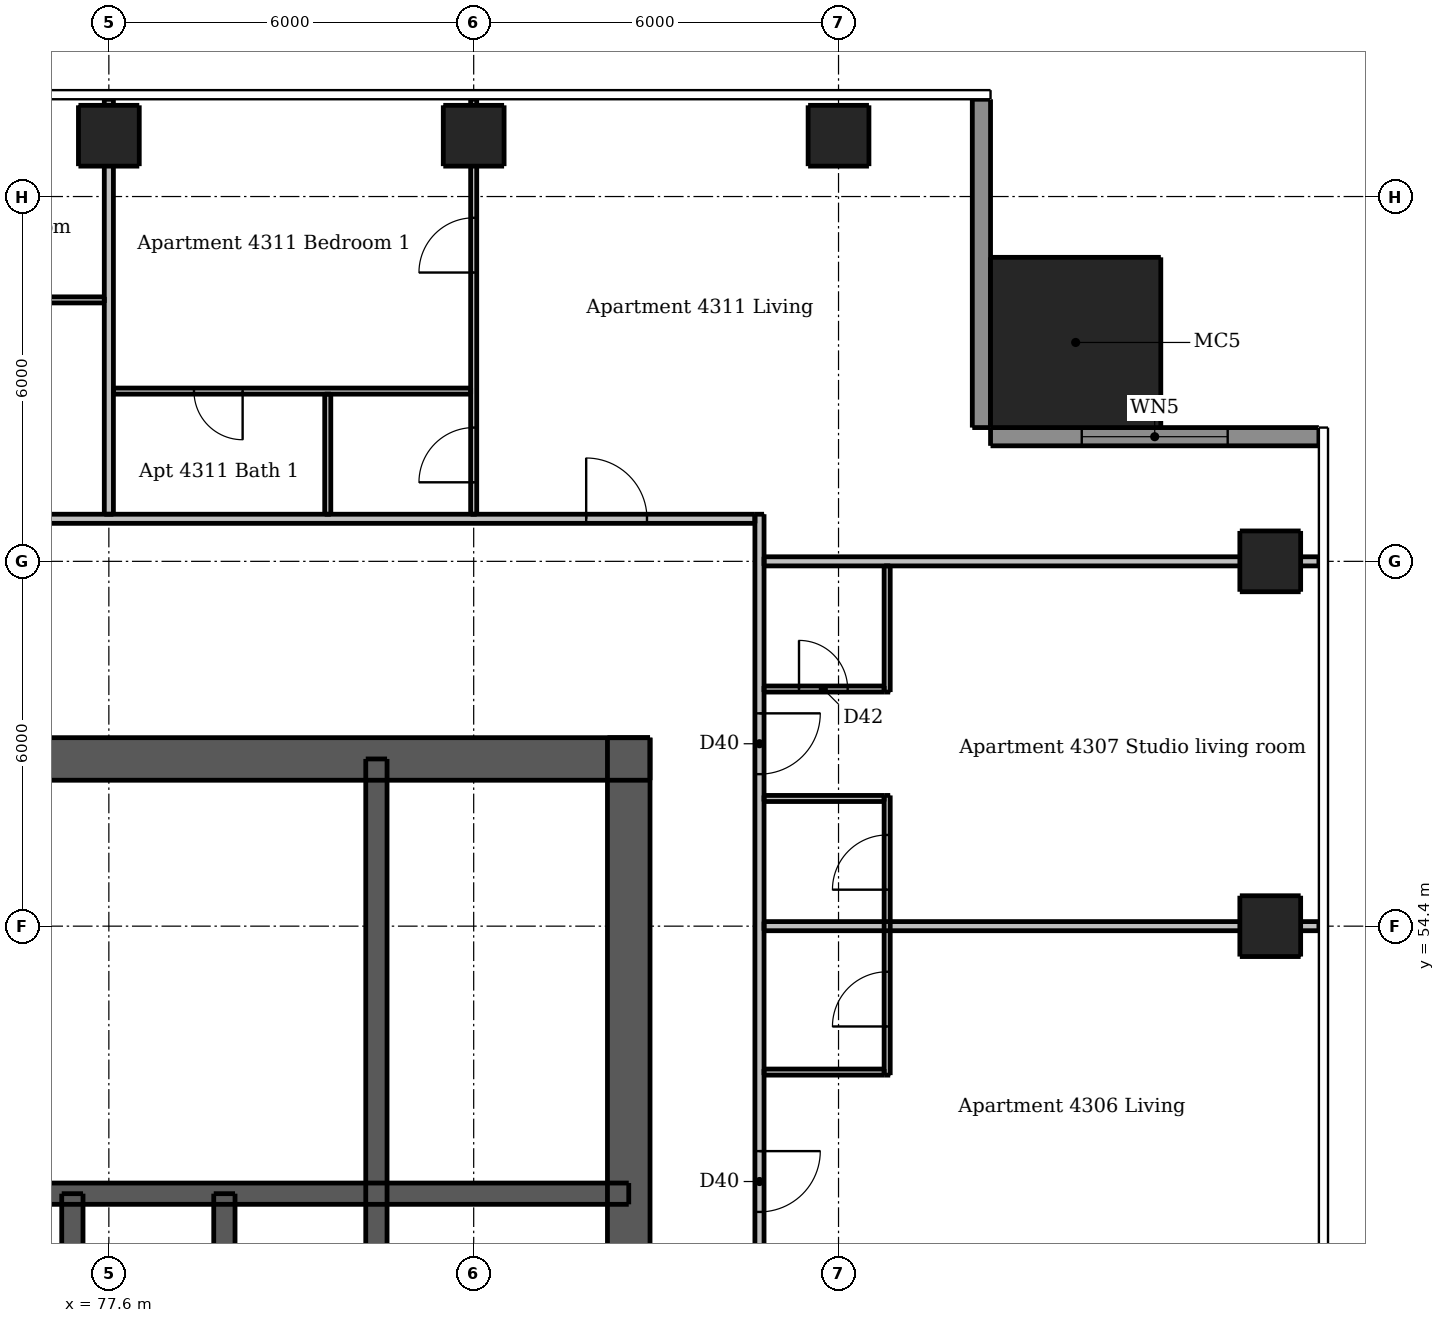
"""IFC4 building model, lengths in metres.
Left out: names, types, materials, properties, quantities, classifications, styles, units other than length and angle.
Written with IfcOpenShell. Run it as: python <this file> out.ifc"""

import sys

from ifc_helpers import new_model, si_unit, direction, frame, frame_2d, origin, origin_2d, place, context, subcontext, project, spatial, rectangle, extrude, element, fill, save


model = new_model("IFC4")
c1 = context("Model", 3, precision=1e-05, world=origin(), true_north=direction((0.0, 1.0)))
c2 = subcontext(c1, "Body", "Model", "MODEL_VIEW")
j1 = project(units=[si_unit("LENGTHUNIT", "METRE"), si_unit("PLANEANGLEUNIT", "RADIAN")], contexts=[c1])
p1 = place(None, origin())
s1 = spatial("IfcSite", under=j1, at=p1, CompositionType="ELEMENT")
p2 = place(p1, origin())
s2 = spatial("IfcBuilding", under=s1, at=p2, CompositionType="ELEMENT")
p3 = place(p2, frame((0.0, 0.0, 161.5)))
s3 = spatial("IfcBuildingStorey", under=s2, at=p3, CompositionType="ELEMENT", Elevation=161.5)
p4 = place(p3, frame((62.5, 57.15, 0.0), z_axis=(0.0, 0.0, 1.0), x_axis=(1.0, 0.0, 0.0)))
e1 = element("IfcWall", 1, at=p4, inside=s3, PredefinedType="SHEAR", context=c2, shape_type="SweptSolid", body=[
    extrude(rectangle(XDim=24.0, YDim=0.7, at=frame_2d((12.0, 0.0))), origin(), (0.0, 0.0, 1.0), 3.05),
])
p5 = place(p4, frame((20.938, 0.0, 0.0)))
e2 = element("IfcOpeningElement", 2, at=p5, cuts=e1, PredefinedType="OPENING", context=c2, shape_type="SweptSolid", body=[
    extrude(rectangle(XDim=1.1, YDim=2.1, at=frame_2d((0.55, 1.05))), frame((0.0, 0.36, 0.0), z_axis=(0.0, -1.0, 0.0), x_axis=(1.0, 0.0, 0.0)), (0.0, 0.0, 1.0), 0.72),
])
p6 = place(p4, frame((1.962, 0.0, 0.0)))
e3 = element("IfcOpeningElement", 3, at=p6, cuts=e1, PredefinedType="OPENING", context=c2, shape_type="SweptSolid", body=[
    extrude(rectangle(XDim=1.1, YDim=2.1, at=frame_2d((0.55, 1.05))), frame((0.0, 0.36, 0.0), z_axis=(0.0, -1.0, 0.0), x_axis=(1.0, 0.0, 0.0)), (0.0, 0.0, 1.0), 0.72),
])
p7 = place(p4, frame((11.55, 0.0, 0.0)))
e4 = element("IfcOpeningElement", 4, at=p7, cuts=e1, PredefinedType="OPENING", context=c2, shape_type="SweptSolid", body=[
    extrude(rectangle(XDim=0.9, YDim=2.1, at=frame_2d((0.45, 1.05))), frame((0.0, 0.36, 0.0), z_axis=(0.0, -1.0, 0.0), x_axis=(1.0, 0.0, 0.0)), (0.0, 0.0, 1.0), 0.72),
])
p8 = place(p3, frame((86.15, 33.5, 0.0), z_axis=(0.0, 0.0, 1.0), x_axis=(0.0, 1.0, 0.0)))
e5 = element("IfcWall", 5, at=p8, inside=s3, PredefinedType="SHEAR", context=c2, shape_type="SweptSolid", body=[
    extrude(rectangle(XDim=24.0, YDim=0.7, at=frame_2d((12.0, 0.0))), origin(), (0.0, 0.0, 1.0), 3.05),
])
p9 = place(p8, frame((11.2, 0.0, 0.0)))
e6 = element("IfcOpeningElement", 6, at=p9, cuts=e5, PredefinedType="OPENING", context=c2, shape_type="SweptSolid", body=[
    extrude(rectangle(XDim=1.6, YDim=2.1, at=frame_2d((0.8, 1.05))), frame((0.0, 0.36, 0.0), z_axis=(0.0, -1.0, 0.0), x_axis=(1.0, 0.0, 0.0)), (0.0, 0.0, 1.0), 0.72),
])
p10 = place(p3, frame((62.85, 50.0, 0.0), z_axis=(0.0, 0.0, 1.0), x_axis=(1.0, 0.0, 0.0)))
e7 = element("IfcWall", 7, at=p10, inside=s3, PredefinedType="SHEAR", context=c2, shape_type="SweptSolid", body=[
    extrude(rectangle(XDim=23.3, YDim=0.35, at=frame_2d((11.65, 0.0))), origin(), (0.0, 0.0, 1.0), 3.05),
])
p11 = place(p3, frame((82.0, 47.1, 0.0), z_axis=(0.0, 0.0, 1.0), x_axis=(0.0, 1.0, 0.0)))
e8 = element("IfcWall", 8, at=p11, inside=s3, PredefinedType="SHEAR", context=c2, shape_type="SweptSolid", body=[
    extrude(rectangle(XDim=10.05, YDim=0.35, at=frame_2d((5.025, 0.0))), origin(), (0.0, 0.0, 1.0), 3.05),
])
for number, where, z_axis, x_axis in (
    (9, (77.0, 47.1, 0.0), (0.0, 0.0, 1.0), (0.0, 1.0, 0.0)),
    (10, (79.5, 47.1, 0.0), (0.0, 0.0, 1.0), (0.0, 1.0, 0.0)),
):
    element("IfcWall", number, at=place(p3, frame(where, z_axis=z_axis, x_axis=x_axis)), inside=s3, PredefinedType="SHEAR", context=c2, shape_type="SweptSolid", body=[
        extrude(rectangle(XDim=2.9, YDim=0.35, at=frame_2d((1.45, 0.0))), origin(), (0.0, 0.0, 1.0), 3.05),
    ])
for number, where, z_axis, x_axis in (
    (11, (96.7, 54.4, 0.0), (0.0, 0.0, 1.0), (1.0, 0.0, 0.0)),
    (12, (96.7, 60.4, 0.0), (0.0, 0.0, 1.0), (1.0, 0.0, 0.0)),
    (13, (77.6, 67.4, 0.0), (0.0, 0.0, 1.0), (1.0, 0.0, 0.0)),
    (14, (83.6, 67.4, 0.0), (0.0, 0.0, 1.0), (1.0, 0.0, 0.0)),
    (15, (89.6, 67.4, 0.0), (0.0, 0.0, 1.0), (1.0, 0.0, 0.0)),
):
    element("IfcColumn", number, at=place(p3, frame(where, z_axis=z_axis, x_axis=x_axis)), inside=s3, PredefinedType="COLUMN", context=c2, shape_type="SweptSolid", body=[
        extrude(rectangle(XDim=1.0, YDim=1.0, at=origin_2d()), origin(), (0.0, 0.0, 1.0), 3.05),
    ])
p12 = place(p3, frame((93.5, 64.0, 0.0), z_axis=(0.0, 0.0, 1.0), x_axis=(1.0, 0.0, 0.0)))
e16 = element("IfcColumn", 16, at=p12, inside=s3, PredefinedType="COLUMN", context=c2, shape_type="SweptSolid", body=[
    extrude(rectangle(XDim=2.8, YDim=2.8, at=origin_2d()), origin(), (0.0, 0.0, 1.0), 3.3),
])
p13 = place(p3, frame((97.5, 62.45, 0.0), z_axis=(0.0, 0.0, 1.0), x_axis=(-1.0, 0.0, 0.0)))
e17 = element("IfcWall", 17, at=p13, inside=s3, PredefinedType="SOLIDWALL", context=c2, shape_type="SweptSolid", body=[
    extrude(rectangle(XDim=5.4, YDim=0.3, at=frame_2d((2.7, 0.0))), origin(), (0.0, 0.0, 1.0), 3.05),
])
p14 = place(p13, frame((1.5, 0.0, 0.15)))
e18 = element("IfcOpeningElement", 18, at=p14, cuts=e17, PredefinedType="OPENING", context=c2, shape_type="SweptSolid", body=[
    extrude(rectangle(XDim=2.4, YDim=2.1, at=frame_2d((1.2, 1.05))), frame((0.0, 0.16, 0.0), z_axis=(0.0, -1.0, 0.0), x_axis=(1.0, 0.0, 0.0)), (0.0, 0.0, 1.0), 0.32),
])
p15 = place(p3, frame((91.95, 62.6, 0.0), z_axis=(0.0, 0.0, 1.0), x_axis=(0.0, 1.0, 0.0)))
e19 = element("IfcWall", 19, at=p15, inside=s3, PredefinedType="SOLIDWALL", context=c2, shape_type="SweptSolid", body=[
    extrude(rectangle(XDim=5.4, YDim=0.3, at=frame_2d((2.7, 0.0))), origin(), (0.0, 0.0, 1.0), 3.05),
])
p16 = place(p3, frame((81.2, 61.175, 0.0), z_axis=(0.0, 0.0, 1.0), x_axis=(0.0, 1.0, 0.0)))
e20 = element("IfcWall", 20, at=p16, inside=s3, PredefinedType="PARTITIONING", context=c2, shape_type="SweptSolid", body=[
    extrude(rectangle(XDim=1.975, YDim=0.1, at=frame_2d((0.987, 0.0))), origin(), (0.0, 0.0, 1.0), 3.05),
])
p17 = place(p3, frame((83.6, 61.175, 0.0), z_axis=(0.0, 0.0, 1.0), x_axis=(0.0, 1.0, 0.0)))
e21 = element("IfcWall", 21, at=p17, inside=s3, PredefinedType="PARTITIONING", context=c2, shape_type="SweptSolid", body=[
    extrude(rectangle(XDim=6.825, YDim=0.1, at=frame_2d((3.413, 0.0))), origin(), (0.0, 0.0, 1.0), 2.516),
])
p18 = place(p17, frame((0.525, 0.0, 0.0)))
e22 = element("IfcOpeningElement", 22, at=p18, cuts=e21, PredefinedType="OPENING", context=c2, shape_type="SweptSolid", body=[
    extrude(rectangle(XDim=0.9, YDim=2.1, at=frame_2d((0.45, 1.05))), frame((0.0, 0.06, 0.0), z_axis=(0.0, -1.0, 0.0), x_axis=(1.0, 0.0, 0.0)), (0.0, 0.0, 1.0), 0.12),
])
p19 = place(p17, frame((3.975, 0.0, 0.0)))
e23 = element("IfcOpeningElement", 23, at=p19, cuts=e21, PredefinedType="OPENING", context=c2, shape_type="SweptSolid", body=[
    extrude(rectangle(XDim=0.9, YDim=2.1, at=frame_2d((0.45, 1.05))), frame((0.0, 0.06, 0.0), z_axis=(0.0, -1.0, 0.0), x_axis=(1.0, 0.0, 0.0)), (0.0, 0.0, 1.0), 0.12),
])
p20 = place(p3, frame((90.4, 51.95, 0.0), z_axis=(0.0, 0.0, 1.0), x_axis=(0.0, 1.0, 0.0)))
e24 = element("IfcWall", 24, at=p20, inside=s3, PredefinedType="PARTITIONING", context=c2, shape_type="SweptSolid", body=[
    extrude(rectangle(XDim=4.6, YDim=0.1, at=frame_2d((2.3, 0.0))), origin(), (0.0, 0.0, 1.0), 3.05),
])
p21 = place(p20, frame((0.8, 0.0, 0.0)))
e25 = element("IfcOpeningElement", 25, at=p21, cuts=e24, PredefinedType="OPENING", context=c2, shape_type="SweptSolid", body=[
    extrude(rectangle(XDim=0.9, YDim=2.1, at=frame_2d((0.45, 1.05))), frame((0.0, 0.06, 0.0), z_axis=(0.0, -1.0, 0.0), x_axis=(1.0, 0.0, 0.0)), (0.0, 0.0, 1.0), 0.12),
])
p22 = place(p20, frame((3.05, 0.0, 0.0)))
e26 = element("IfcOpeningElement", 26, at=p22, cuts=e24, PredefinedType="OPENING", context=c2, shape_type="SweptSolid", body=[
    extrude(rectangle(XDim=0.9, YDim=2.1, at=frame_2d((0.45, 1.05))), frame((0.0, 0.06, 0.0), z_axis=(0.0, -1.0, 0.0), x_axis=(1.0, 0.0, 0.0)), (0.0, 0.0, 1.0), 0.12),
])
p23 = place(p3, frame((90.4, 58.25, 0.0), z_axis=(0.0, 0.0, 1.0), x_axis=(0.0, 1.0, 0.0)))
e27 = element("IfcWall", 27, at=p23, inside=s3, PredefinedType="PARTITIONING", context=c2, shape_type="SweptSolid", body=[
    extrude(rectangle(XDim=2.075, YDim=0.1, at=frame_2d((1.038, 0.0))), origin(), (0.0, 0.0, 1.0), 3.05),
])
p24 = place(p3, frame((75.55, 64.7, 0.0), z_axis=(0.0, 0.0, 1.0), x_axis=(1.0, 0.0, 0.0)))
e28 = element("IfcWall", 28, at=p24, inside=s3, PredefinedType="PARTITIONING", context=c2, shape_type="SweptSolid", body=[
    extrude(rectangle(XDim=1.975, YDim=0.1, at=frame_2d((0.987, 0.0))), origin(), (0.0, 0.0, 1.0), 3.05),
])
p25 = place(p3, frame((83.55, 63.2, 0.0), z_axis=(0.0, 0.0, 1.0), x_axis=(-1.0, 0.0, 0.0)))
e29 = element("IfcWall", 29, at=p25, inside=s3, PredefinedType="PARTITIONING", context=c2, shape_type="SweptSolid", body=[
    extrude(rectangle(XDim=5.875, YDim=0.1, at=frame_2d((2.938, 0.0))), origin(), (0.0, 0.0, 1.0), 3.05),
])
p26 = place(p25, frame((3.75, 0.0, 0.0)))
e30 = element("IfcOpeningElement", 30, at=p26, cuts=e29, PredefinedType="OPENING", context=c2, shape_type="SweptSolid", body=[
    extrude(rectangle(XDim=0.8, YDim=2.1, at=frame_2d((0.4, 1.05))), frame((0.0, 0.06, 0.0), z_axis=(0.0, -1.0, 0.0), x_axis=(1.0, 0.0, 0.0)), (0.0, 0.0, 1.0), 0.12),
])
p27 = place(p3, frame((88.375, 58.3, 0.0), z_axis=(0.0, 0.0, 1.0), x_axis=(1.0, 0.0, 0.0)))
e31 = element("IfcWall", 31, at=p27, inside=s3, PredefinedType="PARTITIONING", context=c2, shape_type="SweptSolid", body=[
    extrude(rectangle(XDim=1.975, YDim=0.1, at=frame_2d((0.988, 0.0))), origin(), (0.0, 0.0, 1.0), 3.05),
])
p28 = place(p27, frame((0.575, 0.0, 0.0)))
e32 = element("IfcOpeningElement", 32, at=p28, cuts=e31, PredefinedType="OPENING", context=c2, shape_type="SweptSolid", body=[
    extrude(rectangle(XDim=0.8, YDim=2.1, at=frame_2d((0.4, 1.05))), frame((0.0, 0.06, 0.0), z_axis=(0.0, -1.0, 0.0), x_axis=(1.0, 0.0, 0.0)), (0.0, 0.0, 1.0), 0.12),
])
for number, where, z_axis, x_axis in (
    (33, (88.375, 56.5, 0.0), (0.0, 0.0, 1.0), (1.0, 0.0, 0.0)),
    (34, (88.375, 52.0, 0.0), (0.0, 0.0, 1.0), (1.0, 0.0, 0.0)),
):
    element("IfcWall", number, at=place(p3, frame(where, z_axis=z_axis, x_axis=x_axis)), inside=s3, PredefinedType="PARTITIONING", context=c2, shape_type="SweptSolid", body=[
        extrude(rectangle(XDim=1.975, YDim=0.1, at=frame_2d((0.988, 0.0))), origin(), (0.0, 0.0, 1.0), 3.05),
    ])
p29 = place(p3, frame((77.6, 61.175, 0.0), z_axis=(0.0, 0.0, 1.0), x_axis=(0.0, 1.0, 0.0)))
e35 = element("IfcWall", 35, at=p29, inside=s3, PredefinedType="PARTITIONING", context=c2, shape_type="SweptSolid", body=[
    extrude(rectangle(XDim=6.825, YDim=0.15, at=frame_2d((3.413, 0.0))), origin(), (0.0, 0.0, 1.0), 2.516),
])
p30 = place(p3, frame((88.3, 61.175, 0.0), z_axis=(0.0, 0.0, 1.0), x_axis=(0.0, -1.0, 0.0)))
e36 = element("IfcWall", 36, at=p30, inside=s3, PredefinedType="PARTITIONING", context=c2, shape_type="SweptSolid", body=[
    extrude(rectangle(XDim=29.4, YDim=0.15, at=frame_2d((14.7, 0.0))), origin(), (0.0, 0.0, 1.0), 3.05),
])
p31 = place(p30, frame((28.125, 0.0, 0.0)))
e37 = element("IfcOpeningElement", 37, at=p31, cuts=e36, PredefinedType="OPENING", context=c2, shape_type="SweptSolid", body=[
    extrude(rectangle(XDim=1.0, YDim=2.1, at=frame_2d((0.5, 1.05))), frame((0.0, 0.085, 0.0), z_axis=(0.0, -1.0, 0.0), x_axis=(1.0, 0.0, 0.0)), (0.0, 0.0, 1.0), 0.17),
])
p32 = place(p30, frame((18.275, 0.0, 0.0)))
e38 = element("IfcOpeningElement", 38, at=p32, cuts=e36, PredefinedType="OPENING", context=c2, shape_type="SweptSolid", body=[
    extrude(rectangle(XDim=1.0, YDim=2.1, at=frame_2d((0.5, 1.05))), frame((0.0, 0.085, 0.0), z_axis=(0.0, -1.0, 0.0), x_axis=(1.0, 0.0, 0.0)), (0.0, 0.0, 1.0), 0.17),
])
p33 = place(p30, frame((10.475, 0.0, 0.0)))
e39 = element("IfcOpeningElement", 39, at=p33, cuts=e36, PredefinedType="OPENING", context=c2, shape_type="SweptSolid", body=[
    extrude(rectangle(XDim=1.0, YDim=2.1, at=frame_2d((0.5, 1.05))), frame((0.0, 0.085, 0.0), z_axis=(0.0, -1.0, 0.0), x_axis=(1.0, 0.0, 0.0)), (0.0, 0.0, 1.0), 0.17),
])
p34 = place(p30, frame((3.275, 0.0, 0.0)))
e40 = element("IfcOpeningElement", 40, at=p34, cuts=e36, PredefinedType="OPENING", context=c2, shape_type="SweptSolid", body=[
    extrude(rectangle(XDim=1.0, YDim=2.1, at=frame_2d((0.5, 1.05))), frame((0.0, 0.085, 0.0), z_axis=(0.0, -1.0, 0.0), x_axis=(1.0, 0.0, 0.0)), (0.0, 0.0, 1.0), 0.17),
])
p35 = place(p3, frame((58.975, 61.1, 0.0), z_axis=(0.0, 0.0, 1.0), x_axis=(1.0, 0.0, 0.0)))
e41 = element("IfcWall", 41, at=p35, inside=s3, PredefinedType="PARTITIONING", context=c2, shape_type="SweptSolid", body=[
    extrude(rectangle(XDim=29.25, YDim=0.15, at=frame_2d((14.625, 0.0))), origin(), (0.0, 0.0, 1.0), 3.05),
])
p36 = place(p35, frame((3.125, 0.0, 0.0)))
e42 = element("IfcOpeningElement", 42, at=p36, cuts=e41, PredefinedType="OPENING", context=c2, shape_type="SweptSolid", body=[
    extrude(rectangle(XDim=1.0, YDim=2.1, at=frame_2d((0.5, 1.05))), frame((0.0, 0.085, 0.0), z_axis=(0.0, -1.0, 0.0), x_axis=(1.0, 0.0, 0.0)), (0.0, 0.0, 1.0), 0.17),
])
p37 = place(p35, frame((9.125, 0.0, 0.0)))
e43 = element("IfcOpeningElement", 43, at=p37, cuts=e41, PredefinedType="OPENING", context=c2, shape_type="SweptSolid", body=[
    extrude(rectangle(XDim=1.0, YDim=2.1, at=frame_2d((0.5, 1.05))), frame((0.0, 0.085, 0.0), z_axis=(0.0, -1.0, 0.0), x_axis=(1.0, 0.0, 0.0)), (0.0, 0.0, 1.0), 0.17),
])
p38 = place(p35, frame((15.125, 0.0, 0.0)))
e44 = element("IfcOpeningElement", 44, at=p38, cuts=e41, PredefinedType="OPENING", context=c2, shape_type="SweptSolid", body=[
    extrude(rectangle(XDim=1.0, YDim=2.1, at=frame_2d((0.5, 1.05))), frame((0.0, 0.085, 0.0), z_axis=(0.0, -1.0, 0.0), x_axis=(1.0, 0.0, 0.0)), (0.0, 0.0, 1.0), 0.17),
])
p39 = place(p35, frame((26.475, 0.0, 0.0)))
e45 = element("IfcOpeningElement", 45, at=p39, cuts=e41, PredefinedType="OPENING", context=c2, shape_type="SweptSolid", body=[
    extrude(rectangle(XDim=1.0, YDim=2.1, at=frame_2d((0.5, 1.05))), frame((0.0, 0.085, 0.0), z_axis=(0.0, -1.0, 0.0), x_axis=(1.0, 0.0, 0.0)), (0.0, 0.0, 1.0), 0.17),
])
p40 = place(p3, frame((88.375, 60.4, 0.0), z_axis=(0.0, 0.0, 1.0), x_axis=(1.0, 0.0, 0.0)))
e46 = element("IfcWall", 46, at=p40, inside=s3, PredefinedType="PARTITIONING", context=c2, shape_type="SweptSolid", body=[
    extrude(rectangle(XDim=9.125, YDim=0.15, at=frame_2d((4.562, 0.0))), origin(), (0.0, 0.0, 1.0), 2.647),
])
p41 = place(p3, frame((88.375, 54.4, 0.0), z_axis=(0.0, 0.0, 1.0), x_axis=(1.0, 0.0, 0.0)))
e47 = element("IfcWall", 47, at=p41, inside=s3, PredefinedType="PARTITIONING", context=c2, shape_type="SweptSolid", body=[
    extrude(rectangle(XDim=9.125, YDim=0.15, at=frame_2d((4.562, 0.0))), origin(), (0.0, 0.0, 1.0), 2.516),
])
p42 = place(p14, origin())
e48 = element("IfcWindow", 48, at=p42, inside=s3, PartitioningType="DOUBLE_PANEL_VERTICAL", PredefinedType="WINDOW", context=c2, shape_type="SweptSolid", body=[
    extrude(rectangle(XDim=2.4, YDim=2.1, at=frame_2d((1.2, 1.05))), frame((0.0, 0.03, 0.0), z_axis=(0.0, -1.0, 0.0), x_axis=(1.0, 0.0, 0.0)), (0.0, 0.0, 1.0), 0.06),
])
fill(e18, e48)
p43 = place(p5, origin())
e49 = element("IfcDoor", 49, at=p43, inside=s3, OperationType="SINGLE_SWING_RIGHT", PredefinedType="DOOR", context=c2, shape_type="SweptSolid", body=[
    extrude(rectangle(XDim=1.1, YDim=2.1, at=frame_2d((0.55, 1.05))), frame((0.0, -0.288, 0.0), z_axis=(0.0, -1.0, 0.0), x_axis=(1.0, 0.0, 0.0)), (0.0, 0.0, 1.0), 0.05),
])
fill(e2, e49)
p44 = place(p33, origin())
e50 = element("IfcDoor", 50, at=p44, inside=s3, OperationType="SINGLE_SWING_LEFT", PredefinedType="DOOR", context=c2, shape_type="SweptSolid", body=[
    extrude(rectangle(XDim=1.0, YDim=2.1, at=frame_2d((0.5, 1.05))), frame((0.0, 0.025, 0.0), z_axis=(0.0, -1.0, 0.0), x_axis=(1.0, 0.0, 0.0)), (0.0, 0.0, 1.0), 0.05),
])
fill(e39, e50)
p45 = place(p21, origin())
e51 = element("IfcDoor", 51, at=p45, inside=s3, OperationType="SINGLE_SWING_LEFT", PredefinedType="DOOR", context=c2, shape_type="SweptSolid", body=[
    extrude(rectangle(XDim=0.9, YDim=2.1, at=frame_2d((0.45, 1.05))), frame((0.0, 0.025, 0.0), z_axis=(0.0, -1.0, 0.0), x_axis=(1.0, 0.0, 0.0)), (0.0, 0.0, 1.0), 0.05),
])
fill(e25, e51)
p46 = place(p34, origin())
e52 = element("IfcDoor", 52, at=p46, inside=s3, OperationType="SINGLE_SWING_LEFT", PredefinedType="DOOR", context=c2, shape_type="SweptSolid", body=[
    extrude(rectangle(XDim=1.0, YDim=2.1, at=frame_2d((0.5, 1.05))), frame((0.0, 0.025, 0.0), z_axis=(0.0, -1.0, 0.0), x_axis=(1.0, 0.0, 0.0)), (0.0, 0.0, 1.0), 0.05),
])
fill(e40, e52)
p47 = place(p22, origin())
e53 = element("IfcDoor", 53, at=p47, inside=s3, OperationType="SINGLE_SWING_LEFT", PredefinedType="DOOR", context=c2, shape_type="SweptSolid", body=[
    extrude(rectangle(XDim=0.9, YDim=2.1, at=frame_2d((0.45, 1.05))), frame((0.0, 0.025, 0.0), z_axis=(0.0, -1.0, 0.0), x_axis=(1.0, 0.0, 0.0)), (0.0, 0.0, 1.0), 0.05),
])
fill(e26, e53)
p48 = place(p28, origin())
e54 = element("IfcDoor", 54, at=p48, inside=s3, OperationType="SINGLE_SWING_LEFT", PredefinedType="DOOR", context=c2, shape_type="SweptSolid", body=[
    extrude(rectangle(XDim=0.8, YDim=2.1, at=frame_2d((0.4, 1.05))), frame((0.0, 0.025, 0.0), z_axis=(0.0, -1.0, 0.0), x_axis=(1.0, 0.0, 0.0)), (0.0, 0.0, 1.0), 0.05),
])
fill(e32, e54)
p49 = place(p39, origin())
e55 = element("IfcDoor", 55, at=p49, inside=s3, OperationType="SINGLE_SWING_LEFT", PredefinedType="DOOR", context=c2, shape_type="SweptSolid", body=[
    extrude(rectangle(XDim=1.0, YDim=2.1, at=frame_2d((0.5, 1.05))), frame((0.0, 0.025, 0.0), z_axis=(0.0, -1.0, 0.0), x_axis=(1.0, 0.0, 0.0)), (0.0, 0.0, 1.0), 0.05),
])
fill(e45, e55)
p50 = place(p18, origin())
e56 = element("IfcDoor", 56, at=p50, inside=s3, OperationType="SINGLE_SWING_LEFT", PredefinedType="DOOR", context=c2, shape_type="SweptSolid", body=[
    extrude(rectangle(XDim=0.9, YDim=2.1, at=frame_2d((0.45, 1.05))), frame((0.0, 0.025, 0.0), z_axis=(0.0, -1.0, 0.0), x_axis=(1.0, 0.0, 0.0)), (0.0, 0.0, 1.0), 0.05),
])
fill(e22, e56)
p51 = place(p19, origin())
e57 = element("IfcDoor", 57, at=p51, inside=s3, OperationType="SINGLE_SWING_LEFT", PredefinedType="DOOR", context=c2, shape_type="SweptSolid", body=[
    extrude(rectangle(XDim=0.9, YDim=2.1, at=frame_2d((0.45, 1.05))), frame((0.0, 0.025, 0.0), z_axis=(0.0, -1.0, 0.0), x_axis=(1.0, 0.0, 0.0)), (0.0, 0.0, 1.0), 0.05),
])
fill(e23, e57)
p52 = place(p26, origin())
e58 = element("IfcDoor", 58, at=p52, inside=s3, OperationType="SINGLE_SWING_LEFT", PredefinedType="DOOR", context=c2, shape_type="SweptSolid", body=[
    extrude(rectangle(XDim=0.8, YDim=2.1, at=frame_2d((0.4, 1.05))), frame((0.0, 0.025, 0.0), z_axis=(0.0, -1.0, 0.0), x_axis=(1.0, 0.0, 0.0)), (0.0, 0.0, 1.0), 0.05),
])
fill(e30, e58)
save(model, sys.argv[1])
